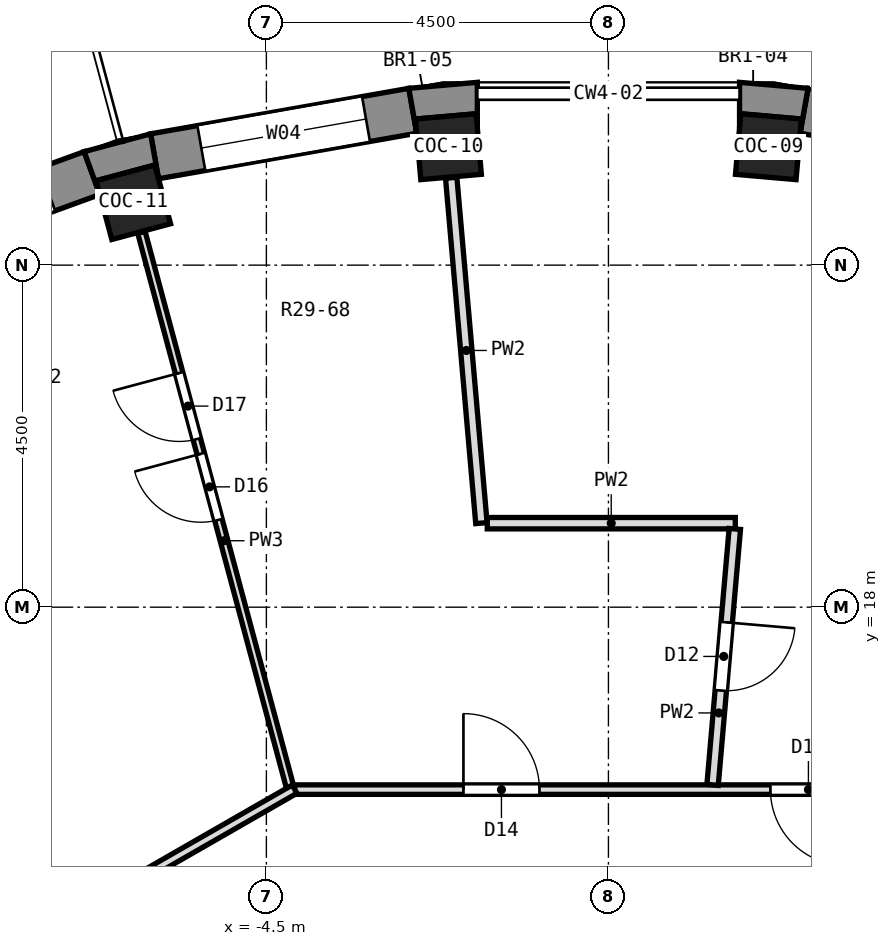
"""IFC4 building model, lengths in metres.
Left out: names, types, materials, properties, quantities, classifications, styles, units other than length and angle.
Written with IfcOpenShell. Run it as: python <this file> out.ifc"""

import sys

from ifc_helpers import new_model, si_unit, direction, frame, frame_2d, origin, origin_2d, place, context, subcontext, project, spatial, polyline, rectangle, outline, extrude, element, fill, save


model = new_model("IFC4")
c1 = context("Model", 3, precision=1e-05, world=origin(), true_north=direction((0.0, 1.0)))
c2 = subcontext(c1, "Body", "Model", "MODEL_VIEW")
j1 = project(units=[si_unit("LENGTHUNIT", "METRE"), si_unit("PLANEANGLEUNIT", "RADIAN")], contexts=[c1])
p1 = place(None, origin())
s1 = spatial("IfcSite", under=j1, at=p1, CompositionType="ELEMENT")
p2 = place(p1, origin())
s2 = spatial("IfcBuilding", under=s1, at=p2, CompositionType="ELEMENT")
p3 = place(p2, frame((0.0, 0.0, 200.4)))
s3 = spatial("IfcBuildingStorey", under=s2, at=p3, CompositionType="ELEMENT", Elevation=200.4)
for number, where, z_axis, x_axis in (
    (1, (2.105, 24.058, 0.0), (0.0, 0.0, 1.0), (0.087, 0.996, 0.0)),
    (2, (-2.105, 24.058, 0.0), (0.0, 0.0, 1.0), (-0.087, 0.996, 0.0)),
    (3, (-6.25, 23.327, 0.0), (0.0, 0.0, 1.0), (-0.259, 0.966, 0.0)),
):
    element("IfcColumn", number, at=place(p3, frame(where, z_axis=z_axis, x_axis=x_axis)), inside=s3, PredefinedType="COLUMN", context=c2, shape_type="SweptSolid", body=[
        extrude(rectangle(XDim=0.8, YDim=0.8, at=origin_2d()), origin(), (0.0, 0.0, 1.0), 3.3),
    ])
p4 = place(p3, frame((5.971, 23.932, 0.0), z_axis=(0.0, 0.0, 1.0), x_axis=(-0.984814892183, 0.173607684551, 0.0)))
e4 = element("IfcWall", 4, at=p4, inside=s3, PredefinedType="SOLIDWALL", context=c2, shape_type="SweptSolid", body=[
    extrude(rectangle(XDim=3.45, YDim=0.6, at=frame_2d((1.725, 0.0))), origin(), (0.0, 0.0, 1.0), 2.85),
])
p5 = place(p4, frame((0.925, 0.0, 0.0)))
e5 = element("IfcOpeningElement", 5, at=p5, cuts=e4, PredefinedType="OPENING", context=c2, shape_type="SweptSolid", body=[
    extrude(rectangle(XDim=1.6, YDim=2.4, at=frame_2d((0.8, 1.2))), frame((0.0, 0.312, 0.0), z_axis=(0.0, -1.0, 0.0), x_axis=(1.0, 0.0, 0.0)), (0.0, 0.0, 1.0), 0.624),
])
p6 = place(p3, frame((-2.574, 24.531, 0.0), z_axis=(0.0, 0.0, 1.0), x_axis=(-0.984814892183, -0.173607684551, 0.0)))
e6 = element("IfcWall", 6, at=p6, inside=s3, PredefinedType="SOLIDWALL", context=c2, shape_type="SweptSolid", body=[
    extrude(rectangle(XDim=3.45, YDim=0.6, at=frame_2d((1.725, 0.0))), origin(), (0.0, 0.0, 1.0), 2.85),
])
p7 = place(p6, frame((0.625, 0.0, 0.9)))
e7 = element("IfcOpeningElement", 7, at=p7, cuts=e6, PredefinedType="OPENING", context=c2, shape_type="SweptSolid", body=[
    extrude(rectangle(XDim=2.2, YDim=1.8, at=frame_2d((1.1, 0.9))), frame((0.0, 0.312, 0.0), z_axis=(0.0, -1.0, 0.0), x_axis=(1.0, 0.0, 0.0)), (0.0, 0.0, 1.0), 0.624),
])
p8 = place(p3, frame((-6.794, 23.711, 0.0), z_axis=(0.0, 0.0, 1.0), x_axis=(-0.93968799822, -0.342032843455, 0.0)))
e8 = element("IfcWall", 8, at=p8, inside=s3, PredefinedType="SOLIDWALL", context=c2, shape_type="SweptSolid", body=[
    extrude(rectangle(XDim=3.45, YDim=0.6, at=frame_2d((1.725, 0.0))), origin(), (0.0, 0.0, 1.0), 2.85),
])
p9 = place(p8, frame((0.625, 0.0, 0.9)))
e9 = element("IfcOpeningElement", 9, at=p9, cuts=e8, PredefinedType="OPENING", context=c2, shape_type="SweptSolid", body=[
    extrude(rectangle(XDim=2.2, YDim=1.8, at=frame_2d((1.1, 0.9))), frame((0.0, 0.312, 0.0), z_axis=(0.0, -1.0, 0.0), x_axis=(1.0, 0.0, 0.0)), (0.0, 0.0, 1.0), 0.624),
])
p10 = place(p3, origin())
e10 = element("IfcWall", 10, at=p10, inside=s3, PredefinedType="SOLIDWALL", context=c2, shape_type="SweptSolid", body=[
    extrude(outline(polyline([(2.626, 24.826), (1.725, 24.905), (1.725, 24.305), (1.741, 24.491), (2.538, 24.422), (2.522, 24.235), (2.626, 24.826)])), origin(), (0.0, 0.0, 1.0), 2.85),
])
p11 = place(p3, origin())
e11 = element("IfcWall", 11, at=p11, inside=s3, PredefinedType="SOLIDWALL", context=c2, shape_type="SweptSolid", body=[
    extrude(outline(polyline([(-1.725, 24.905), (-2.626, 24.826), (-2.522, 24.235), (-2.538, 24.422), (-1.741, 24.491), (-1.725, 24.305), (-1.725, 24.905)])), origin(), (0.0, 0.0, 1.0), 2.85),
])
p12 = place(p3, origin())
e12 = element("IfcWall", 12, at=p12, inside=s3, PredefinedType="SOLIDWALL", context=c2, shape_type="SweptSolid", body=[
    extrude(outline(polyline([(-6.023, 24.227), (-6.897, 23.993), (-6.692, 23.429), (-6.74, 23.61), (-5.968, 23.817), (-5.919, 23.636), (-6.023, 24.227)])), origin(), (0.0, 0.0, 1.0), 2.85),
])
p13 = place(p3, origin())
e13 = element("IfcWall", 13, at=p13, inside=s3, PredefinedType="PARAPET", context=c2, shape_type="SweptSolid", body=[
    extrude(outline(polyline([(11.52, 24.705), (7.055, 26.33), (2.376, 27.155), (2.323, 26.555), (6.899, 25.748), (11.265, 24.159), (11.52, 24.705)])), origin(), (0.0, 0.0, 1.0), 0.5),
])
p14 = place(p3, frame((-2.069, 23.65, 0.0), z_axis=(0.0, 0.0, 1.0), x_axis=(0.087195502411, -0.996191218772, 0.0)))
e14 = element("IfcWall", 14, at=p14, inside=s3, PredefinedType="PARTITIONING", context=c2, shape_type="SweptSolid", body=[
    extrude(rectangle(XDim=4.561, YDim=0.15, at=frame_2d((2.281, 0.0))), origin(), (0.0, 0.0, 1.0), 2.85),
])
p15 = place(p3, frame((-6.144, 22.931, 0.0), z_axis=(0.0, 0.0, 1.0), x_axis=(0.258789681819, -0.965933693679, 0.0)))
e15 = element("IfcWall", 15, at=p15, inside=s3, PredefinedType="PARTITIONING", context=c2, shape_type="SweptSolid", body=[
    extrude(rectangle(XDim=7.59, YDim=0.1, at=frame_2d((3.795, 0.0))), origin(), (0.0, 0.0, 1.0), 2.85),
])
p16 = place(p15, frame((3.016, 0.0, 0.0)))
e16 = element("IfcOpeningElement", 16, at=p16, cuts=e15, PredefinedType="OPENING", context=c2, shape_type="SweptSolid", body=[
    extrude(rectangle(XDim=0.9, YDim=2.1, at=frame_2d((0.45, 1.05))), frame((0.0, 0.062, 0.0), z_axis=(0.0, -1.0, 0.0), x_axis=(1.0, 0.0, 0.0)), (0.0, 0.0, 1.0), 0.124),
])
p17 = place(p15, frame((1.916, 0.0, 0.0)))
e17 = element("IfcOpeningElement", 17, at=p17, cuts=e15, PredefinedType="OPENING", context=c2, shape_type="SweptSolid", body=[
    extrude(rectangle(XDim=0.9, YDim=2.1, at=frame_2d((0.45, 1.05))), frame((0.0, 0.062, 0.0), z_axis=(0.0, -1.0, 0.0), x_axis=(1.0, 0.0, 0.0)), (0.0, 0.0, 1.0), 0.124),
])
p18 = place(p3, frame((-4.129, 15.6, 0.0), z_axis=(0.0, 0.0, 1.0), x_axis=(1.0, 0.0, 0.0)))
e18 = element("IfcWall", 18, at=p18, inside=s3, PredefinedType="PARTITIONING", context=c2, shape_type="SweptSolid", body=[
    extrude(rectangle(XDim=8.246, YDim=0.125, at=frame_2d((4.123, 0.0))), origin(), (0.0, 0.0, 1.0), 2.85),
])
p19 = place(p18, frame((6.26, 0.0, 0.0)))
e19 = element("IfcOpeningElement", 19, at=p19, cuts=e18, PredefinedType="OPENING", context=c2, shape_type="SweptSolid", body=[
    extrude(rectangle(XDim=1.0, YDim=2.1, at=frame_2d((0.5, 1.05))), frame((0.0, 0.074, 0.0), z_axis=(0.0, -1.0, 0.0), x_axis=(1.0, 0.0, 0.0)), (0.0, 0.0, 1.0), 0.149),
])
p20 = place(p18, frame((2.221, 0.0, 0.0)))
e20 = element("IfcOpeningElement", 20, at=p20, cuts=e18, PredefinedType="OPENING", context=c2, shape_type="SweptSolid", body=[
    extrude(rectangle(XDim=1.0, YDim=2.1, at=frame_2d((0.5, 1.05))), frame((0.0, 0.074, 0.0), z_axis=(0.0, -1.0, 0.0), x_axis=(1.0, 0.0, 0.0)), (0.0, 0.0, 1.0), 0.149),
])
p21 = place(p3, frame((-1.594, 19.105, 0.0), z_axis=(0.0, 0.0, 1.0), x_axis=(1.0, 0.0, 0.0)))
e21 = element("IfcWall", 21, at=p21, inside=s3, PredefinedType="PARTITIONING", context=c2, shape_type="SweptSolid", body=[
    extrude(rectangle(XDim=3.263, YDim=0.15, at=frame_2d((1.631, 0.0))), origin(), (0.0, 0.0, 1.0), 2.85),
])
p22 = place(p3, frame((-11.484, 11.385, 0.0), z_axis=(0.0, 0.0, 1.0), x_axis=(0.867290156456, 0.497802957519, 0.0)))
e22 = element("IfcWall", 22, at=p22, inside=s3, PredefinedType="PARTITIONING", context=c2, shape_type="SweptSolid", body=[
    extrude(rectangle(XDim=8.48, YDim=0.125, at=frame_2d((4.24, 0.0))), origin(), (0.0, 0.0, 1.0), 2.85),
])
p23 = place(p3, frame((1.37, 15.662, 0.0), z_axis=(0.0, 0.0, 1.0), x_axis=(0.086536105046, 0.996248715193, 0.0)))
e23 = element("IfcWall", 23, at=p23, inside=s3, PredefinedType="PARTITIONING", context=c2, shape_type="SweptSolid", body=[
    extrude(rectangle(XDim=3.38, YDim=0.15, at=frame_2d((1.69, 0.0))), origin(), (0.0, 0.0, 1.0), 2.85),
])
p24 = place(p23, frame((1.246, 0.0, 0.0)))
e24 = element("IfcOpeningElement", 24, at=p24, cuts=e23, PredefinedType="OPENING", context=c2, shape_type="SweptSolid", body=[
    extrude(rectangle(XDim=0.9, YDim=2.1, at=frame_2d((0.45, 1.05))), frame((0.0, 0.087, 0.0), z_axis=(0.0, -1.0, 0.0), x_axis=(1.0, 0.0, 0.0)), (0.0, 0.0, 1.0), 0.174),
])
p25 = place(p7, origin())
e25 = element("IfcWindow", 25, at=p25, inside=s3, PartitioningType="SINGLE_PANEL", PredefinedType="WINDOW", context=c2, shape_type="SweptSolid", body=[
    extrude(rectangle(XDim=2.2, YDim=1.8, at=frame_2d((1.1, 0.9))), frame((0.0, 0.18, 0.0), z_axis=(0.0, -1.0, 0.0), x_axis=(1.0, 0.0, 0.0)), (0.0, 0.0, 1.0), 0.06),
])
fill(e7, e25)
p26 = place(p19, frame((1.0, 0.0, 0.0), z_axis=(0.0, 0.0, 1.0), x_axis=(-1.0, 0.0, 0.0)))
e26 = element("IfcDoor", 26, at=p26, inside=s3, OperationType="SINGLE_SWING_LEFT", PredefinedType="DOOR", context=c2, shape_type="SweptSolid", body=[
    extrude(rectangle(XDim=1.0, YDim=2.1, at=frame_2d((0.5, 1.05))), frame((0.0, 0.025, 0.0), z_axis=(0.0, -1.0, 0.0), x_axis=(1.0, 0.0, 0.0)), (0.0, 0.0, 1.0), 0.05),
])
fill(e19, e26)
p27 = place(p24, frame((0.9, 0.0, 0.0), z_axis=(0.0, 0.0, 1.0), x_axis=(-1.0, 0.0, 0.0)))
e27 = element("IfcDoor", 27, at=p27, inside=s3, OperationType="SINGLE_SWING_LEFT", PredefinedType="DOOR", context=c2, shape_type="SweptSolid", body=[
    extrude(rectangle(XDim=0.9, YDim=2.1, at=frame_2d((0.45, 1.05))), frame((0.0, 0.025, 0.0), z_axis=(0.0, -1.0, 0.0), x_axis=(1.0, 0.0, 0.0)), (0.0, 0.0, 1.0), 0.05),
])
fill(e24, e27)
p28 = place(p20, origin())
e28 = element("IfcDoor", 28, at=p28, inside=s3, OperationType="SINGLE_SWING_LEFT", PredefinedType="DOOR", context=c2, shape_type="SweptSolid", body=[
    extrude(rectangle(XDim=1.0, YDim=2.1, at=frame_2d((0.5, 1.05))), frame((0.0, 0.025, 0.0), z_axis=(0.0, -1.0, 0.0), x_axis=(1.0, 0.0, 0.0)), (0.0, 0.0, 1.0), 0.05),
])
fill(e20, e28)
p29 = place(p16, frame((0.9, 0.0, 0.0), z_axis=(0.0, 0.0, 1.0), x_axis=(-1.0, 0.0, 0.0)))
e29 = element("IfcDoor", 29, at=p29, inside=s3, OperationType="SINGLE_SWING_RIGHT", PredefinedType="DOOR", context=c2, shape_type="SweptSolid", body=[
    extrude(rectangle(XDim=0.9, YDim=2.1, at=frame_2d((0.45, 1.05))), frame((0.0, 0.025, 0.0), z_axis=(0.0, -1.0, 0.0), x_axis=(1.0, 0.0, 0.0)), (0.0, 0.0, 1.0), 0.05),
])
fill(e16, e29)
p30 = place(p17, frame((0.9, 0.0, 0.0), z_axis=(0.0, 0.0, 1.0), x_axis=(-1.0, 0.0, 0.0)))
e30 = element("IfcDoor", 30, at=p30, inside=s3, OperationType="SINGLE_SWING_RIGHT", PredefinedType="DOOR", context=c2, shape_type="SweptSolid", body=[
    extrude(rectangle(XDim=0.9, YDim=2.1, at=frame_2d((0.45, 1.05))), frame((0.0, 0.025, 0.0), z_axis=(0.0, -1.0, 0.0), x_axis=(1.0, 0.0, 0.0)), (0.0, 0.0, 1.0), 0.05),
])
fill(e17, e30)
save(model, sys.argv[1])
